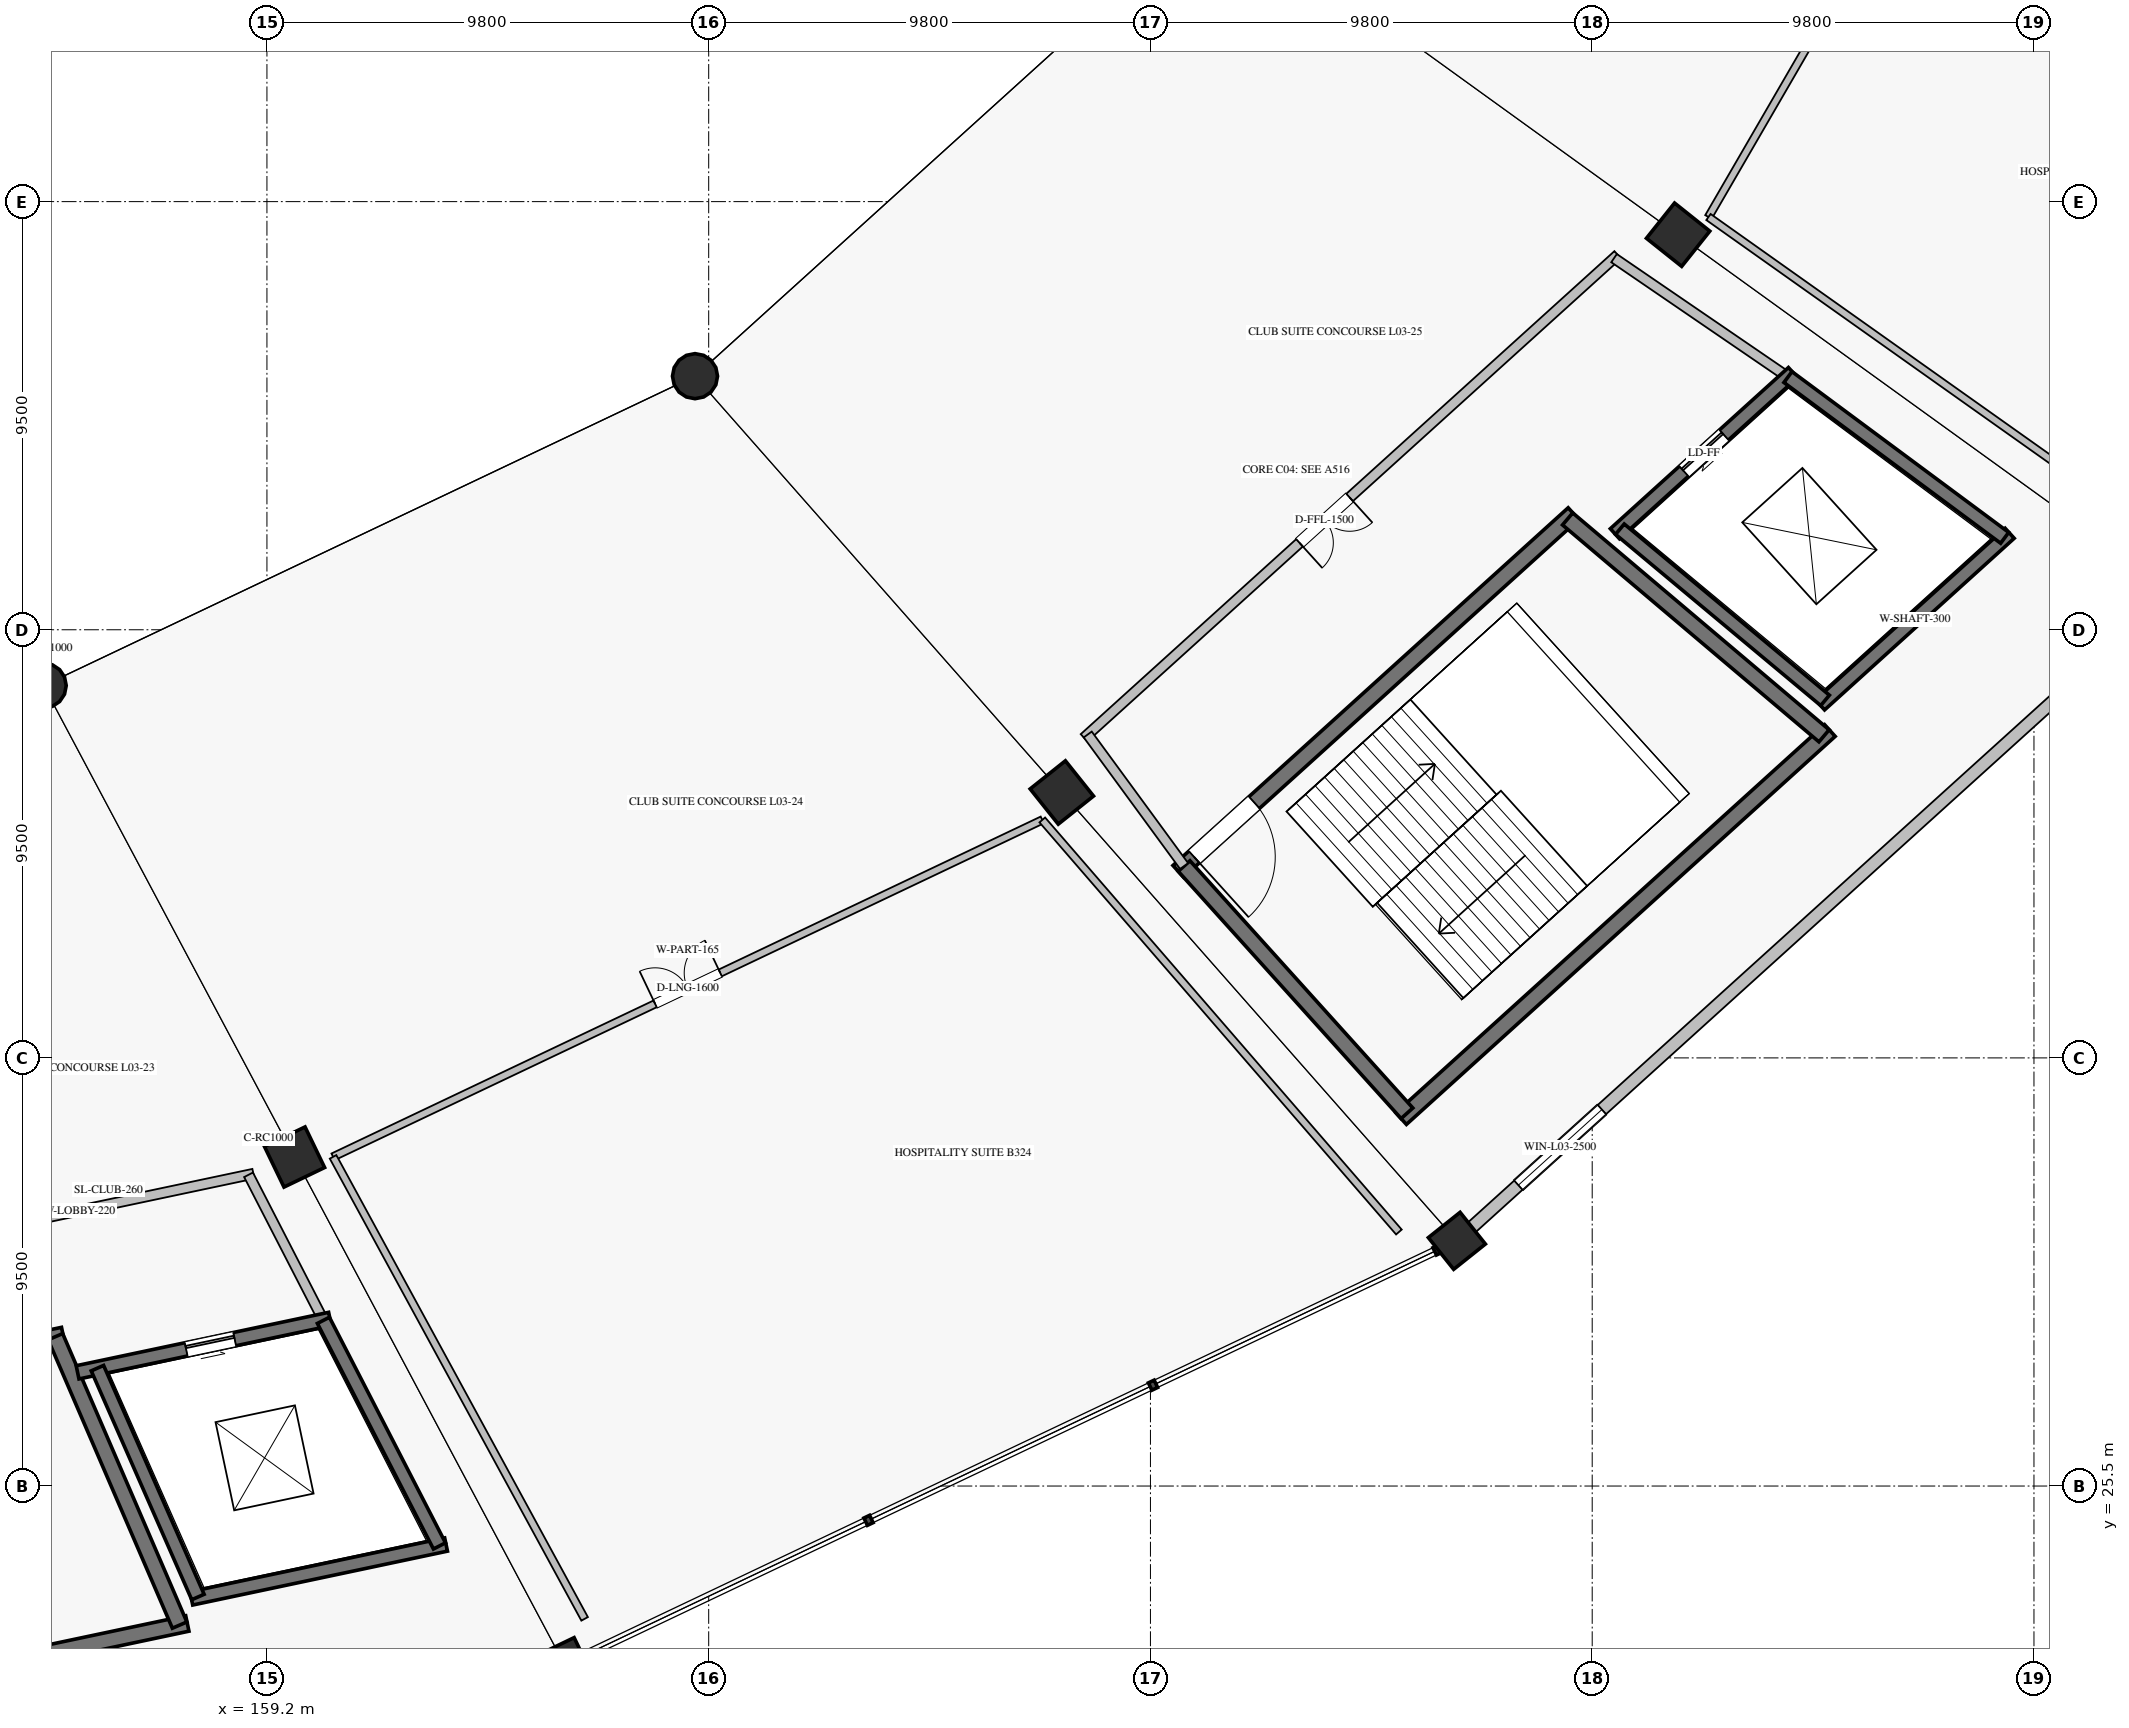
"""IFC4 building model, lengths in metres.
Left out: names, types, materials, properties, quantities, classifications, styles, units other than length and angle.
Written with IfcOpenShell. Run it as: python <this file> out.ifc"""

import sys

from ifc_helpers import new_model, si_unit, direction, frame, frame_2d, origin, origin_2d, place, context, subcontext, project, spatial, rectangle, circle, extrude, element, fill, save


model = new_model("IFC4")
c1 = context("Model", 3, precision=1e-05, world=origin(), true_north=direction((0.0, 1.0)))
c2 = subcontext(c1, "Body", "Model", "MODEL_VIEW")
j1 = project(units=[si_unit("LENGTHUNIT", "METRE"), si_unit("PLANEANGLEUNIT", "RADIAN")], contexts=[c1])
p1 = place(None, origin())
s1 = spatial("IfcSite", under=j1, at=p1, CompositionType="ELEMENT")
p2 = place(p1, origin())
s2 = spatial("IfcBuilding", under=s1, at=p2, CompositionType="ELEMENT")
p3 = place(p2, frame((0.0, 0.0, 15.64)))
s3 = spatial("IfcBuildingStorey", under=s2, at=p3, CompositionType="ELEMENT", Elevation=15.64)
for number, where, z_axis, x_axis in (
    (1, (154.248, 43.261, 0.0), (0.0, 0.0, 1.0), (0.434, -0.901, 0.0)),
    (2, (168.697, 50.127, 0.0), (0.0, 0.0, 1.0), (0.623, -0.782, 0.0)),
):
    element("IfcColumn", number, at=place(p3, frame(where, z_axis=z_axis, x_axis=x_axis)), inside=s3, PredefinedType="COLUMN", context=c2, shape_type="SweptSolid", body=[
        extrude(circle(Radius=0.5, at=origin_2d()), origin(), (0.0, 0.0, 1.0), 4.76),
    ])
for number, where, z_axis, x_axis in (
    (3, (159.812, 32.801, 0.0), (0.0, 0.0, 1.0), (0.434, -0.901, 0.0)),
    (4, (176.834, 40.889, 0.0), (0.0, 0.0, 1.0), (0.623, -0.782, 0.0)),
    (5, (190.506, 53.266, 0.0), (0.0, 0.0, 1.0), (0.782, -0.623, 0.0)),
):
    element("IfcColumn", number, at=place(p3, frame(where, z_axis=z_axis, x_axis=x_axis)), inside=s3, PredefinedType="COLUMN", context=c2, shape_type="SweptSolid", body=[
        extrude(rectangle(XDim=1.0, YDim=1.0, at=origin_2d()), origin(), (0.0, 0.0, 1.0), 4.76),
    ])
for number, where, z_axis, x_axis in (
    (6, (165.805, 21.536, 0.0), (0.0, 0.0, 1.0), (0.434, -0.901, 0.0)),
    (7, (185.598, 30.941, 0.0), (0.0, 0.0, 1.0), (0.623, -0.782, 0.0)),
):
    element("IfcColumn", number, at=place(p3, frame(where, z_axis=z_axis, x_axis=x_axis)), inside=s3, PredefinedType="COLUMN", context=c2, shape_type="SweptSolid", body=[
        extrude(rectangle(XDim=0.9, YDim=0.9, at=origin_2d()), origin(), (0.0, 0.0, 1.0), 4.76),
    ])
p4 = place(p3, frame((185.924, 31.236, 0.0), z_axis=(0.0, 0.0, 1.0), x_axis=(0.741352367697, 0.671115986183, 0.0)))
e8 = element("IfcWall", 8, at=p4, inside=s3, PredefinedType="SOLIDWALL", context=c2, shape_type="SweptSolid", body=[
    extrude(rectangle(XDim=20.564, YDim=0.275, at=frame_2d((10.282, 0.0))), origin(), (0.0, 0.0, 1.0), 3.81),
])
p5 = place(p4, frame((1.4, 0.0, 1.0)))
e9 = element("IfcOpeningElement", 9, at=p5, cuts=e8, PredefinedType="OPENING", context=c2, shape_type="SweptSolid", body=[
    extrude(rectangle(XDim=2.5, YDim=1.95, at=frame_2d((1.25, 0.975))), frame((0.0, 0.147, 0.0), z_axis=(0.0, -1.0, 0.0), x_axis=(1.0, 0.0, 0.0)), (0.0, 0.0, 1.0), 0.295),
])
p6 = place(p3, frame((142.896, 26.357, 0.0), z_axis=(0.0, 0.0, 1.0), x_axis=(0.978345203961, 0.206979858648, 0.0)))
e10 = element("IfcWall", 10, at=p6, inside=s3, PredefinedType="SHEAR", context=c2, shape_type="SweptSolid", body=[
    extrude(rectangle(XDim=12.044, YDim=0.35, at=frame_2d((6.022, 0.0))), origin(), (0.0, 0.0, 1.0), 4.46),
])
p7 = place(p6, frame((0.475, 0.0, 0.0)))
e11 = element("IfcOpeningElement", 11, at=p7, cuts=e10, PredefinedType="OPENING", context=c2, shape_type="SweptSolid", body=[
    extrude(rectangle(XDim=1.8, YDim=2.2, at=frame_2d((0.9, 1.1))), frame((0.0, 0.185, 0.0), z_axis=(0.0, -1.0, 0.0), x_axis=(1.0, 0.0, 0.0)), (0.0, 0.0, 1.0), 0.37),
])
p8 = place(p3, frame((144.65, 19.746, 0.0), z_axis=(0.0, 0.0, 1.0), x_axis=(0.978345119536, 0.206980257705, 0.0)))
e12 = element("IfcWall", 12, at=p8, inside=s3, PredefinedType="SHEAR", context=c2, shape_type="SweptSolid", body=[
    extrude(rectangle(XDim=13.067, YDim=0.35, at=frame_2d((6.533, 0.0))), origin(), (0.0, 0.0, 1.0), 4.46),
])
p9 = place(p3, frame((154.508, 28.814, 0.0), z_axis=(0.0, 0.0, 1.0), x_axis=(0.395453834155, -0.918485854574, 0.0)))
e13 = element("IfcWall", 13, at=p9, inside=s3, PredefinedType="SHEAR", context=c2, shape_type="SweptSolid", body=[
    extrude(rectangle(XDim=6.968, YDim=0.35, at=frame_2d((3.484, 0.0))), origin(), (0.0, 0.0, 1.0), 4.46),
])
p10 = place(p3, frame((154.999, 28.023, 0.0), z_axis=(0.0, 0.0, 1.0), x_axis=(0.978345218992, 0.206979787601, 0.0)))
e14 = element("IfcWall", 14, at=p10, inside=s3, PredefinedType="SHEAR", context=c2, shape_type="SweptSolid", body=[
    extrude(rectangle(XDim=5.724, YDim=0.3, at=frame_2d((2.862, 0.0))), origin(), (0.0, 0.0, 1.0), 4.46),
])
p11 = place(p10, frame((2.462, 0.0, 0.0)))
e15 = element("IfcOpeningElement", 15, at=p11, cuts=e14, PredefinedType="OPENING", context=c2, shape_type="SweptSolid", body=[
    extrude(rectangle(XDim=1.1, YDim=2.2, at=frame_2d((0.55, 1.1))), frame((0.0, 0.16, 0.0), z_axis=(0.0, -1.0, 0.0), x_axis=(1.0, 0.0, 0.0)), (0.0, 0.0, 1.0), 0.32),
])
p12 = place(p3, frame((157.523, 23.006, 0.0), z_axis=(0.0, 0.0, 1.0), x_axis=(0.978347069901, 0.206971038591, 0.0)))
e16 = element("IfcWall", 16, at=p12, inside=s3, PredefinedType="SHEAR", context=c2, shape_type="SweptSolid", body=[
    extrude(rectangle(XDim=5.776, YDim=0.3, at=frame_2d((2.888, 0.0))), origin(), (0.0, 0.0, 1.0), 4.46),
])
p13 = place(p3, frame((155.44, 28.116, 0.0), z_axis=(0.0, 0.0, 1.0), x_axis=(0.402005363577, -0.915637312289, 0.0)))
e17 = element("IfcWall", 17, at=p13, inside=s3, PredefinedType="SHEAR", context=c2, shape_type="SweptSolid", body=[
    extrude(rectangle(XDim=5.547, YDim=0.3, at=frame_2d((2.773, 0.0))), origin(), (0.0, 0.0, 1.0), 4.46),
])
p14 = place(p3, frame((160.453, 29.177, 0.0), z_axis=(0.0, 0.0, 1.0), x_axis=(0.457368592987, -0.889277217829, 0.0)))
e18 = element("IfcWall", 18, at=p14, inside=s3, PredefinedType="SHEAR", context=c2, shape_type="SweptSolid", body=[
    extrude(rectangle(XDim=5.629, YDim=0.3, at=frame_2d((2.814, 0.0))), origin(), (0.0, 0.0, 1.0), 4.46),
])
p15 = place(p3, frame((142.284, 28.914, 0.0), z_axis=(0.0, 0.0, 1.0), x_axis=(0.97834522483, 0.206979760008, 0.0)))
e19 = element("IfcWall", 19, at=p15, inside=s3, PredefinedType="SOLIDWALL", context=c2, shape_type="SweptSolid", body=[
    extrude(rectangle(XDim=16.983, YDim=0.22, at=frame_2d((8.491, 0.0))), origin(), (0.0, 0.0, 1.0), 4.46),
])
p16 = place(p15, frame((6.903, 0.0, 0.0)))
e20 = element("IfcOpeningElement", 20, at=p16, cuts=e19, PredefinedType="OPENING", context=c2, shape_type="SweptSolid", body=[
    extrude(rectangle(XDim=1.5, YDim=2.2, at=frame_2d((0.75, 1.1))), frame((0.0, 0.12, 0.0), z_axis=(0.0, -1.0, 0.0), x_axis=(1.0, 0.0, 0.0)), (0.0, 0.0, 1.0), 0.24),
])
p17 = place(p3, frame((158.792, 32.406, 0.0), z_axis=(0.0, 0.0, 1.0), x_axis=(0.457349531643, -0.889287021105, 0.0)))
e21 = element("IfcWall", 21, at=p17, inside=s3, PredefinedType="SOLIDWALL", context=c2, shape_type="SweptSolid", body=[
    extrude(rectangle(XDim=3.632, YDim=0.22, at=frame_2d((1.816, 0.0))), origin(), (0.0, 0.0, 1.0), 4.46),
])
p18 = place(p3, frame((179.417, 39.14, 0.0), z_axis=(0.0, 0.0, 1.0), x_axis=(0.741348929385, 0.671119784315, 0.0)))
e22 = element("IfcWall", 22, at=p18, inside=s3, PredefinedType="SHEAR", context=c2, shape_type="SweptSolid", body=[
    extrude(rectangle(XDim=11.826, YDim=0.35, at=frame_2d((5.913, 0.0))), origin(), (0.0, 0.0, 1.0), 4.46),
])
p19 = place(p18, frame((0.475, 0.0, 0.0)))
e23 = element("IfcOpeningElement", 23, at=p19, cuts=e22, PredefinedType="OPENING", context=c2, shape_type="SweptSolid", body=[
    extrude(rectangle(XDim=1.8, YDim=2.2, at=frame_2d((0.9, 1.1))), frame((0.0, 0.185, 0.0), z_axis=(0.0, -1.0, 0.0), x_axis=(1.0, 0.0, 0.0)), (0.0, 0.0, 1.0), 0.37),
])
p20 = place(p3, frame((184.361, 33.653, 0.0), z_axis=(0.0, 0.0, 1.0), x_axis=(0.741351373721, 0.671117084183, 0.0)))
e24 = element("IfcWall", 24, at=p20, inside=s3, PredefinedType="SHEAR", context=c2, shape_type="SweptSolid", body=[
    extrude(rectangle(XDim=12.83, YDim=0.35, at=frame_2d((6.415, 0.0))), origin(), (0.0, 0.0, 1.0), 4.46),
])
p21 = place(p3, frame((179.546, 39.257, 0.0), z_axis=(0.0, 0.0, 1.0), x_axis=(0.669463145673, -0.742845270958, 0.0)))
e25 = element("IfcWall", 25, at=p21, inside=s3, PredefinedType="SHEAR", context=c2, shape_type="SweptSolid", body=[
    extrude(rectangle(XDim=7.386, YDim=0.35, at=frame_2d((3.693, 0.0))), origin(), (0.0, 0.0, 1.0), 4.46),
])
p22 = place(p3, frame((188.055, 46.959, 0.0), z_axis=(0.0, 0.0, 1.0), x_axis=(0.763422324031, -0.64589964791, 0.0)))
e26 = element("IfcWall", 26, at=p22, inside=s3, PredefinedType="SHEAR", context=c2, shape_type="SweptSolid", body=[
    extrude(rectangle(XDim=7.452, YDim=0.35, at=frame_2d((3.726, 0.0))), origin(), (0.0, 0.0, 1.0), 4.46),
])
p23 = place(p3, frame((189.103, 46.631, 0.0), z_axis=(0.0, 0.0, 1.0), x_axis=(0.741350155641, 0.671118429736, 0.0)))
e27 = element("IfcWall", 27, at=p23, inside=s3, PredefinedType="SHEAR", context=c2, shape_type="SweptSolid", body=[
    extrude(rectangle(XDim=5.329, YDim=0.3, at=frame_2d((2.665, 0.0))), origin(), (0.0, 0.0, 1.0), 4.46),
])
p24 = place(p23, frame((2.065, 0.0, 0.0)))
e28 = element("IfcOpeningElement", 28, at=p24, cuts=e27, PredefinedType="OPENING", context=c2, shape_type="SweptSolid", body=[
    extrude(rectangle(XDim=1.2, YDim=2.2, at=frame_2d((0.6, 1.1))), frame((0.0, 0.16, 0.0), z_axis=(0.0, -1.0, 0.0), x_axis=(1.0, 0.0, 0.0)), (0.0, 0.0, 1.0), 0.32),
])
p25 = place(p3, frame((193.654, 42.832, 0.0), z_axis=(0.0, 0.0, 1.0), x_axis=(0.74134208775, 0.671127341815, 0.0)))
e29 = element("IfcWall", 29, at=p25, inside=s3, PredefinedType="SHEAR", context=c2, shape_type="SweptSolid", body=[
    extrude(rectangle(XDim=5.675, YDim=0.3, at=frame_2d((2.837, 0.0))), origin(), (0.0, 0.0, 1.0), 4.46),
])
p26 = place(p3, frame((189.214, 46.732, 0.0), z_axis=(0.0, 0.0, 1.0), x_axis=(0.767711354146, -0.640795815151, 0.0)))
e30 = element("IfcWall", 30, at=p26, inside=s3, PredefinedType="SHEAR", context=c2, shape_type="SweptSolid", body=[
    extrude(rectangle(XDim=5.929, YDim=0.3, at=frame_2d((2.964, 0.0))), origin(), (0.0, 0.0, 1.0), 4.46),
])
p27 = place(p3, frame((192.942, 50.107, 0.0), z_axis=(0.0, 0.0, 1.0), x_axis=(0.803101805449, -0.59584183311, 0.0)))
e31 = element("IfcWall", 31, at=p27, inside=s3, PredefinedType="SHEAR", context=c2, shape_type="SweptSolid", body=[
    extrude(rectangle(XDim=5.986, YDim=0.3, at=frame_2d((2.993, 0.0))), origin(), (0.0, 0.0, 1.0), 4.46),
])
p28 = place(p3, frame((177.327, 42.102, 0.0), z_axis=(0.0, 0.0, 1.0), x_axis=(0.741351035574, 0.671117457717, 0.0)))
e32 = element("IfcWall", 32, at=p28, inside=s3, PredefinedType="SOLIDWALL", context=c2, shape_type="SweptSolid", body=[
    extrude(rectangle(XDim=15.969, YDim=0.22, at=frame_2d((7.985, 0.0))), origin(), (0.0, 0.0, 1.0), 4.46),
])
p29 = place(p28, frame((6.447, 0.0, 0.0)))
e33 = element("IfcOpeningElement", 33, at=p29, cuts=e32, PredefinedType="OPENING", context=c2, shape_type="SweptSolid", body=[
    extrude(rectangle(XDim=1.5, YDim=2.2, at=frame_2d((0.75, 1.1))), frame((0.0, 0.12, 0.0), z_axis=(0.0, -1.0, 0.0), x_axis=(1.0, 0.0, 0.0)), (0.0, 0.0, 1.0), 0.24),
])
p30 = place(p3, frame((177.409, 42.176, 0.0), z_axis=(0.0, 0.0, 1.0), x_axis=(0.590836915359, -0.806791013491, 0.0)))
e34 = element("IfcWall", 34, at=p30, inside=s3, PredefinedType="SOLIDWALL", context=c2, shape_type="SweptSolid", body=[
    extrude(rectangle(XDim=3.618, YDim=0.22, at=frame_2d((1.809, 0.0))), origin(), (0.0, 0.0, 1.0), 4.46),
])
p31 = place(p3, frame((189.085, 52.746, 0.0), z_axis=(0.0, 0.0, 1.0), x_axis=(0.825385410642, -0.564569680287, 0.0)))
e35 = element("IfcWall", 35, at=p31, inside=s3, PredefinedType="SOLIDWALL", context=c2, shape_type="SweptSolid", body=[
    extrude(rectangle(XDim=4.674, YDim=0.22, at=frame_2d((2.337, 0.0))), origin(), (0.0, 0.0, 1.0), 4.46),
])
p32 = place(p3, frame((160.667, 32.804, 0.0), z_axis=(0.0, 0.0, 1.0), x_axis=(0.903217202186, 0.429183743488, 0.0)))
e36 = element("IfcWall", 36, at=p32, inside=s3, PredefinedType="PARTITIONING", context=c2, shape_type="SweptSolid", body=[
    extrude(rectangle(XDim=17.419, YDim=0.165, at=frame_2d((8.709, 0.0))), origin(), (0.0, 0.0, 1.0), 3.78),
])
p33 = place(p32, frame((7.91, 0.0, 0.0)))
e37 = element("IfcOpeningElement", 37, at=p33, cuts=e36, PredefinedType="OPENING", context=c2, shape_type="SweptSolid", body=[
    extrude(rectangle(XDim=1.6, YDim=2.3, at=frame_2d((0.8, 1.15))), frame((0.0, 0.093, 0.0), z_axis=(0.0, -1.0, 0.0), x_axis=(1.0, 0.0, 0.0)), (0.0, 0.0, 1.0), 0.185),
])
p34 = place(p3, frame((160.667, 32.804, 0.0), z_axis=(0.0, 0.0, 1.0), x_axis=(0.478125060974, -0.878291765912, 0.0)))
e38 = element("IfcWall", 38, at=p34, inside=s3, PredefinedType="PARTITIONING", context=c2, shape_type="SweptSolid", body=[
    extrude(rectangle(XDim=11.672, YDim=0.165, at=frame_2d((5.836, 0.0))), origin(), (0.0, 0.0, 1.0), 3.78),
])
p35 = place(p3, frame((176.401, 40.28, 0.0), z_axis=(0.0, 0.0, 1.0), x_axis=(0.654293035882, -0.756241114458, 0.0)))
e39 = element("IfcWall", 39, at=p35, inside=s3, PredefinedType="PARTITIONING", context=c2, shape_type="SweptSolid", body=[
    extrude(rectangle(XDim=12.091, YDim=0.165, at=frame_2d((6.045, 0.0))), origin(), (0.0, 0.0, 1.0), 3.78),
])
p36 = place(p3, frame((191.179, 53.658, 0.0), z_axis=(0.0, 0.0, 1.0), x_axis=(0.501617777052, 0.865089362867, 0.0)))
e40 = element("IfcWall", 40, at=p36, inside=s3, PredefinedType="PARTITIONING", context=c2, shape_type="SweptSolid", body=[
    extrude(rectangle(XDim=16.464, YDim=0.165, at=frame_2d((8.232, 0.0))), origin(), (0.0, 0.0, 1.0), 3.78),
])
p37 = place(p36, frame((7.432, 0.0, 0.0)))
e41 = element("IfcOpeningElement", 41, at=p37, cuts=e40, PredefinedType="OPENING", context=c2, shape_type="SweptSolid", body=[
    extrude(rectangle(XDim=1.6, YDim=2.3, at=frame_2d((0.8, 1.15))), frame((0.0, 0.093, 0.0), z_axis=(0.0, -1.0, 0.0), x_axis=(1.0, 0.0, 0.0)), (0.0, 0.0, 1.0), 0.185),
])
p38 = place(p3, frame((191.179, 53.658, 0.0), z_axis=(0.0, 0.0, 1.0), x_axis=(0.815753527099, -0.578399674122, 0.0)))
e42 = element("IfcWall", 42, at=p38, inside=s3, PredefinedType="PARTITIONING", context=c2, shape_type="SweptSolid", body=[
    extrude(rectangle(XDim=12.382, YDim=0.165, at=frame_2d((6.191, 0.0))), origin(), (0.0, 0.0, 1.0), 3.78),
])
p39 = place(p5, origin())
e43 = element("IfcWindow", 43, at=p39, inside=s3, PartitioningType="SINGLE_PANEL", PredefinedType="WINDOW", context=c2, shape_type="SweptSolid", body=[
    extrude(rectangle(XDim=2.5, YDim=1.95, at=frame_2d((1.25, 0.975))), frame((0.0, 0.03, 0.0), z_axis=(0.0, -1.0, 0.0), x_axis=(1.0, 0.0, 0.0)), (0.0, 0.0, 1.0), 0.06),
])
fill(e9, e43)
p40 = place(p11, origin())
e44 = element("IfcDoor", 44, at=p40, inside=s3, OperationType="SLIDING_TO_RIGHT", PredefinedType="DOOR", context=c2, shape_type="SweptSolid", body=[
    extrude(rectangle(XDim=1.1, YDim=2.2, at=frame_2d((0.55, 1.1))), frame((0.0, 0.025, 0.0), z_axis=(0.0, -1.0, 0.0), x_axis=(1.0, 0.0, 0.0)), (0.0, 0.0, 1.0), 0.05),
])
fill(e15, e44)
p41 = place(p19, frame((1.8, 0.0, 0.0), z_axis=(0.0, 0.0, 1.0), x_axis=(-1.0, 0.0, 0.0)))
e45 = element("IfcDoor", 45, at=p41, inside=s3, OperationType="SINGLE_SWING_RIGHT", PredefinedType="DOOR", context=c2, shape_type="SweptSolid", body=[
    extrude(rectangle(XDim=1.8, YDim=2.2, at=frame_2d((0.9, 1.1))), frame((0.0, 0.025, 0.0), z_axis=(0.0, -1.0, 0.0), x_axis=(1.0, 0.0, 0.0)), (0.0, 0.0, 1.0), 0.05),
])
fill(e23, e45)
p42 = place(p24, origin())
e46 = element("IfcDoor", 46, at=p42, inside=s3, OperationType="SLIDING_TO_LEFT", PredefinedType="DOOR", context=c2, shape_type="SweptSolid", body=[
    extrude(rectangle(XDim=1.2, YDim=2.2, at=frame_2d((0.6, 1.1))), frame((0.0, 0.025, 0.0), z_axis=(0.0, -1.0, 0.0), x_axis=(1.0, 0.0, 0.0)), (0.0, 0.0, 1.0), 0.05),
])
fill(e28, e46)
p43 = place(p29, frame((1.5, 0.0, 0.0), z_axis=(0.0, 0.0, 1.0), x_axis=(-1.0, 0.0, 0.0)))
e47 = element("IfcDoor", 47, at=p43, inside=s3, OperationType="DOUBLE_DOOR_SINGLE_SWING", PredefinedType="DOOR", context=c2, shape_type="SweptSolid", body=[
    extrude(rectangle(XDim=1.5, YDim=2.2, at=frame_2d((0.75, 1.1))), frame((0.0, 0.025, 0.0), z_axis=(0.0, -1.0, 0.0), x_axis=(1.0, 0.0, 0.0)), (0.0, 0.0, 1.0), 0.05),
])
fill(e33, e47)
p44 = place(p33, origin())
e48 = element("IfcDoor", 48, at=p44, inside=s3, OperationType="DOUBLE_DOOR_SINGLE_SWING", PredefinedType="DOOR", context=c2, shape_type="SweptSolid", body=[
    extrude(rectangle(XDim=1.6, YDim=2.3, at=frame_2d((0.8, 1.15))), frame((0.0, 0.025, 0.0), z_axis=(0.0, -1.0, 0.0), x_axis=(1.0, 0.0, 0.0)), (0.0, 0.0, 1.0), 0.05),
])
fill(e37, e48)
save(model, sys.argv[1])
